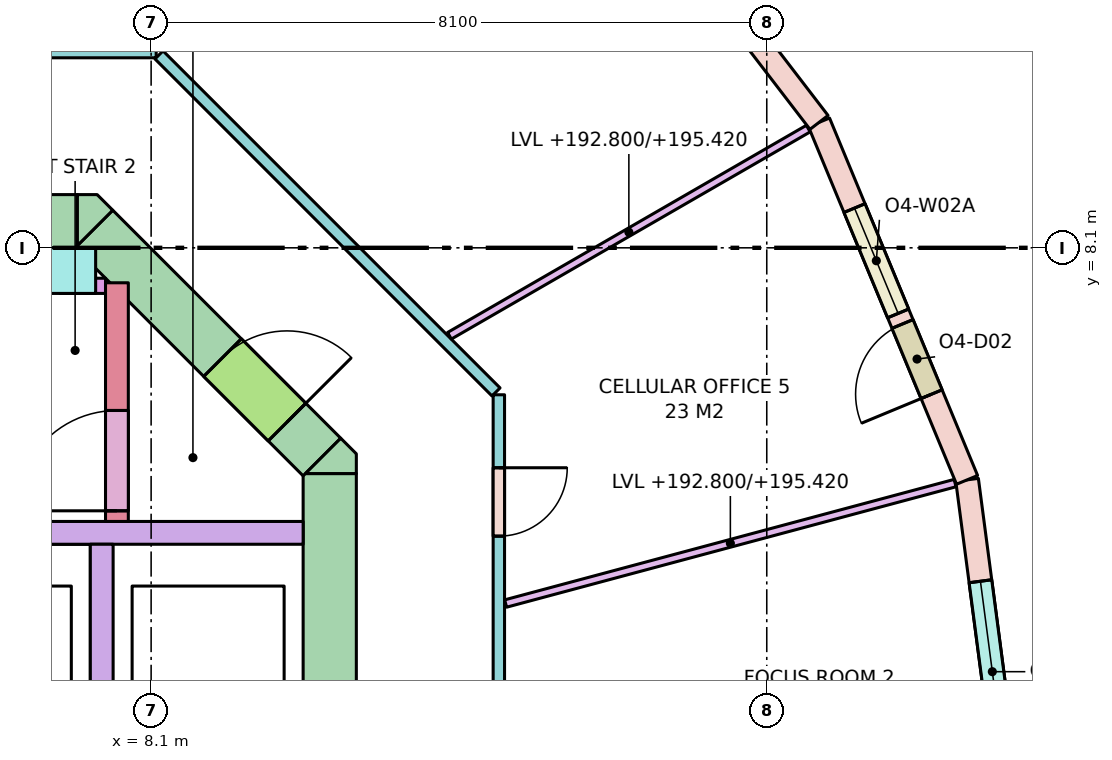
"""IFC4 building model, lengths in metres.
Left out: names, types, materials, properties, quantities, classifications, styles, units other than length and angle.
Written with IfcOpenShell. Run it as: python <this file> out.ifc"""

import sys

from ifc_helpers import new_model, si_unit, direction, frame, frame_2d, origin, place, context, subcontext, project, spatial, polyline, rectangle, outline, extrude, element, fill, save


model = new_model("IFC4")
c1 = context("Model", 3, precision=1e-05, world=origin(), true_north=direction((0.0, 1.0)))
c2 = subcontext(c1, "Body", "Model", "MODEL_VIEW")
j1 = project(units=[si_unit("LENGTHUNIT", "METRE"), si_unit("PLANEANGLEUNIT", "RADIAN")], contexts=[c1])
p1 = place(None, origin())
s1 = spatial("IfcSite", under=j1, at=p1, CompositionType="ELEMENT")
p2 = place(p1, origin())
s2 = spatial("IfcBuilding", under=s1, at=p2, CompositionType="ELEMENT")
p3 = place(p2, frame((0.0, 0.0, 192.8)))
s3 = spatial("IfcBuildingStorey", under=s2, at=p3, CompositionType="ELEMENT", Elevation=192.8)
p4 = place(p3, frame((-7.13, 8.45, -0.28), z_axis=(0.0, 0.0, 1.0), x_axis=(1.0, 0.0, 0.0)))
e1 = element("IfcWall", 1, at=p4, inside=s3, PredefinedType="SHEAR", context=c2, shape_type="SweptSolid", body=[
    extrude(rectangle(XDim=14.26, YDim=0.7, at=frame_2d((7.13, 0.0))), origin(), (0.0, 0.0, 1.0), 3.7),
])
p5 = place(p4, frame((5.48, 0.0, 0.28)))
e2 = element("IfcOpeningElement", 2, at=p5, cuts=e1, PredefinedType="OPENING", context=c2, shape_type="SweptSolid", body=[
    extrude(rectangle(XDim=0.7, YDim=2.1, at=frame_2d((0.35, 1.05))), frame((0.0, 0.36, 0.0), z_axis=(0.0, -1.0, 0.0), x_axis=(1.0, 0.0, 0.0)), (0.0, 0.0, 1.0), 0.72),
])
p6 = place(p4, frame((7.155, 0.0, 0.28)))
e3 = element("IfcOpeningElement", 3, at=p6, cuts=e1, PredefinedType="OPENING", context=c2, shape_type="SweptSolid", body=[
    extrude(rectangle(XDim=0.9, YDim=2.1, at=frame_2d((0.45, 1.05))), frame((0.0, 0.36, 0.0), z_axis=(0.0, -1.0, 0.0), x_axis=(1.0, 0.0, 0.0)), (0.0, 0.0, 1.0), 0.72),
])
p7 = place(p3, frame((10.45, -5.13, -0.28), z_axis=(0.0, 0.0, 1.0), x_axis=(0.0, 1.0, 0.0)))
e4 = element("IfcWall", 4, at=p7, inside=s3, PredefinedType="SHEAR", context=c2, shape_type="SweptSolid", body=[
    extrude(rectangle(XDim=10.26, YDim=0.7, at=frame_2d((5.13, 0.0))), origin(), (0.0, 0.0, 1.0), 3.7),
])
p8 = place(p7, frame((4.13, 0.0, 0.28)))
e5 = element("IfcOpeningElement", 5, at=p8, cuts=e4, PredefinedType="OPENING", context=c2, shape_type="SweptSolid", body=[
    extrude(rectangle(XDim=2.0, YDim=2.1, at=frame_2d((1.0, 1.05))), frame((0.0, 0.36, 0.0), z_axis=(0.0, -1.0, 0.0), x_axis=(1.0, 0.0, 0.0)), (0.0, 0.0, 1.0), 0.72),
])
p9 = place(p3, frame((7.347, 8.347, -0.28), z_axis=(0.0, 0.0, 1.0), x_axis=(0.707106781187, -0.707106781187, 0.0)))
e6 = element("IfcWall", 6, at=p9, inside=s3, PredefinedType="SHEAR", context=c2, shape_type="SweptSolid", body=[
    extrude(rectangle(XDim=4.243, YDim=0.7, at=frame_2d((2.121, 0.0))), origin(), (0.0, 0.0, 1.0), 3.7),
])
p10 = place(p9, frame((2.393, 0.0, 0.28)))
e7 = element("IfcOpeningElement", 7, at=p10, cuts=e6, PredefinedType="OPENING", context=c2, shape_type="SweptSolid", body=[
    extrude(rectangle(XDim=1.2, YDim=2.1, at=frame_2d((0.6, 1.05))), frame((0.0, 0.36, 0.0), z_axis=(0.0, -1.0, 0.0), x_axis=(1.0, 0.0, 0.0)), (0.0, 0.0, 1.0), 0.72),
])
p11 = place(p3, frame((0.0, 0.0, -0.28)))
e8 = element("IfcWall", 8, at=p11, inside=s3, PredefinedType="SHEAR", context=c2, shape_type="SweptSolid", body=[
    extrude(outline(polyline([(10.8, 5.39), (10.8, 5.13), (10.8, 5.13), (10.13, 5.13), (10.595, 5.595), (10.595, 5.595), (10.595, 5.595), (10.8, 5.39)])), origin(), (0.0, 0.0, 1.0), 3.7),
])
p12 = place(p3, frame((0.0, 0.0, -0.28)))
e9 = element("IfcWall", 9, at=p12, inside=s3, PredefinedType="SHEAR", context=c2, shape_type="SweptSolid", body=[
    extrude(outline(polyline([(7.39, 8.8), (7.595, 8.595), (7.595, 8.595), (7.595, 8.595), (7.13, 8.13), (7.13, 8.8), (7.13, 8.8), (7.39, 8.8)])), origin(), (0.0, 0.0, 1.0), 3.7),
])
p13 = place(p3, frame((2.0, 4.35, 0.0), z_axis=(0.0, 0.0, 1.0), x_axis=(1.0, 0.0, 0.0)))
e10 = element("IfcWall", 10, at=p13, inside=s3, PredefinedType="SOLIDWALL", context=c2, shape_type="SweptSolid", body=[
    extrude(rectangle(XDim=8.1, YDim=0.3, at=frame_2d((4.05, 0.0))), origin(), (0.0, 0.0, 1.0), 3.42),
])
p14 = place(p3, frame((7.45, 1.8, 0.0), z_axis=(0.0, 0.0, 1.0), x_axis=(0.0, 1.0, 0.0)))
e11 = element("IfcWall", 11, at=p14, inside=s3, PredefinedType="SOLIDWALL", context=c2, shape_type="SweptSolid", body=[
    extrude(rectangle(XDim=2.4, YDim=0.3, at=frame_2d((1.2, 0.0))), origin(), (0.0, 0.0, 1.0), 3.42),
])
p15 = place(p3, frame((7.65, 4.5, 0.0), z_axis=(0.0, 0.0, 1.0), x_axis=(0.0, 1.0, 0.0)))
e12 = element("IfcWall", 12, at=p15, inside=s3, PredefinedType="SHEAR", context=c2, shape_type="SweptSolid", body=[
    extrude(rectangle(XDim=3.14, YDim=0.3, at=frame_2d((1.57, 0.0))), origin(), (0.0, 0.0, 1.0), 3.42),
])
p16 = place(p15, frame((0.14, 0.0, 0.0)))
e13 = element("IfcOpeningElement", 13, at=p16, cuts=e12, PredefinedType="OPENING", context=c2, shape_type="SweptSolid", body=[
    extrude(rectangle(XDim=1.32, YDim=2.1, at=frame_2d((0.66, 1.05))), frame((0.0, 0.16, 0.0), z_axis=(0.0, -1.0, 0.0), x_axis=(1.0, 0.0, 0.0)), (0.0, 0.0, 1.0), 0.32),
])
p17 = place(p3, frame((2.0, 7.8, 0.0), z_axis=(0.0, 0.0, 1.0), x_axis=(1.0, 0.0, 0.0)))
e14 = element("IfcWall", 14, at=p17, inside=s3, PredefinedType="SHEAR", context=c2, shape_type="SweptSolid", body=[
    extrude(rectangle(XDim=5.37, YDim=0.6, at=frame_2d((2.685, 0.0))), origin(), (0.0, 0.0, 1.0), 3.42),
])
p18 = place(p3, frame((6.9, 7.6, 0.0), z_axis=(0.0, 0.0, 1.0), x_axis=(1.0, 0.0, 0.0)))
e15 = element("IfcWall", 15, at=p18, inside=s3, PredefinedType="SHEAR", context=c2, shape_type="SweptSolid", body=[
    extrude(rectangle(XDim=0.6, YDim=0.2, at=frame_2d((0.3, 0.0))), origin(), (0.0, 0.0, 1.0), 3.42),
])
p19 = place(p3, frame((19.5, 0.0, 0.0), z_axis=(0.0, 0.0, 1.0), x_axis=(-0.130495451964, 0.99144890792, 0.0)))
e16 = element("IfcWall", 16, at=p19, inside=s3, PredefinedType="STANDARD", context=c2, shape_type="SweptSolid", body=[
    extrude(rectangle(XDim=5.091, YDim=0.3, at=frame_2d((2.545, 0.0))), origin(), (0.0, 0.0, 1.0), 3.42),
])
p20 = place(p19, frame((1.345, 0.0, 0.8)))
e17 = element("IfcOpeningElement", 17, at=p20, cuts=e16, PredefinedType="OPENING", context=c2, shape_type="SweptSolid", body=[
    extrude(rectangle(XDim=2.4, YDim=2.4, at=frame_2d((1.2, 1.2))), frame((0.0, 0.16, 0.0), z_axis=(0.0, -1.0, 0.0), x_axis=(1.0, 0.0, 0.0)), (0.0, 0.0, 1.0), 0.32),
])
p21 = place(p3, frame((18.836, 5.047, 0.0), z_axis=(0.0, 0.0, 1.0), x_axis=(-0.382724538613, 0.923862504675, 0.0)))
e18 = element("IfcWall", 18, at=p21, inside=s3, PredefinedType="STANDARD", context=c2, shape_type="SweptSolid", body=[
    extrude(rectangle(XDim=5.091, YDim=0.3, at=frame_2d((2.545, 0.0))), origin(), (0.0, 0.0, 1.0), 3.42),
])
p22 = place(p21, frame((1.22, 0.0, 0.0)))
e19 = element("IfcOpeningElement", 19, at=p22, cuts=e18, PredefinedType="OPENING", context=c2, shape_type="SweptSolid", body=[
    extrude(rectangle(XDim=1.0, YDim=2.4, at=frame_2d((0.5, 1.2))), frame((0.0, 0.16, 0.0), z_axis=(0.0, -1.0, 0.0), x_axis=(1.0, 0.0, 0.0)), (0.0, 0.0, 1.0), 0.32),
])
p23 = place(p21, frame((2.37, 0.0, 0.8)))
e20 = element("IfcOpeningElement", 20, at=p23, cuts=e18, PredefinedType="OPENING", context=c2, shape_type="SweptSolid", body=[
    extrude(rectangle(XDim=1.5, YDim=2.4, at=frame_2d((0.75, 1.2))), frame((0.0, 0.16, 0.0), z_axis=(0.0, -1.0, 0.0), x_axis=(1.0, 0.0, 0.0)), (0.0, 0.0, 1.0), 0.32),
])
p24 = place(p3, frame((16.887, 9.75, 0.0), z_axis=(0.0, 0.0, 1.0), x_axis=(-0.608757714995, 0.79335619014, 0.0)))
e21 = element("IfcWall", 21, at=p24, inside=s3, PredefinedType="STANDARD", context=c2, shape_type="SweptSolid", body=[
    extrude(rectangle(XDim=5.091, YDim=0.3, at=frame_2d((2.545, 0.0))), origin(), (0.0, 0.0, 1.0), 3.42),
])
p25 = place(p24, frame((1.345, 0.0, 0.8)))
e22 = element("IfcOpeningElement", 22, at=p25, cuts=e21, PredefinedType="OPENING", context=c2, shape_type="SweptSolid", body=[
    extrude(rectangle(XDim=2.4, YDim=2.4, at=frame_2d((1.2, 1.2))), frame((0.0, 0.16, 0.0), z_axis=(0.0, -1.0, 0.0), x_axis=(1.0, 0.0, 0.0)), (0.0, 0.0, 1.0), 0.32),
])
p26 = place(p3, frame((-8.167, 10.675, 0.0), z_axis=(0.0, 0.0, 1.0), x_axis=(1.0, 0.0, 0.0)))
e23 = element("IfcWall", 23, at=p26, inside=s3, PredefinedType="PARTITIONING", context=c2, shape_type="SweptSolid", body=[
    extrude(rectangle(XDim=16.333, YDim=0.15, at=frame_2d((8.167, 0.0))), origin(), (0.0, 0.0, 1.0), 2.62),
])
p27 = place(p26, frame((8.24, 0.0, 0.0)))
e24 = element("IfcOpeningElement", 24, at=p27, cuts=e23, PredefinedType="OPENING", context=c2, shape_type="SweptSolid", body=[
    extrude(rectangle(XDim=1.8, YDim=2.1, at=frame_2d((0.9, 1.05))), frame((0.0, 0.085, 0.0), z_axis=(0.0, -1.0, 0.0), x_axis=(1.0, 0.0, 0.0)), (0.0, 0.0, 1.0), 0.17),
])
p28 = place(p3, frame((8.204, 10.638, 0.0), z_axis=(0.0, 0.0, 1.0), x_axis=(0.707106781187, -0.707106781187, 0.0)))
e25 = element("IfcWall", 25, at=p28, inside=s3, PredefinedType="PARTITIONING", context=c2, shape_type="SweptSolid", body=[
    extrude(rectangle(XDim=6.271, YDim=0.15, at=frame_2d((3.135, 0.0))), origin(), (0.0, 0.0, 1.0), 2.62),
])
p29 = place(p3, frame((12.675, 6.167, 0.0), z_axis=(0.0, 0.0, 1.0), x_axis=(0.0, -1.0, 0.0)))
e26 = element("IfcWall", 26, at=p29, inside=s3, PredefinedType="PARTITIONING", context=c2, shape_type="SweptSolid", body=[
    extrude(rectangle(XDim=9.563, YDim=0.15, at=frame_2d((4.781, 0.0))), origin(), (0.0, 0.0, 1.0), 2.62),
])
p30 = place(p29, frame((6.94, 0.0, 0.0)))
e27 = element("IfcOpeningElement", 27, at=p30, cuts=e26, PredefinedType="OPENING", context=c2, shape_type="SweptSolid", body=[
    extrude(rectangle(XDim=1.8, YDim=2.1, at=frame_2d((0.9, 1.05))), frame((0.0, 0.085, 0.0), z_axis=(0.0, -1.0, 0.0), x_axis=(1.0, 0.0, 0.0)), (0.0, 0.0, 1.0), 0.17),
])
p31 = place(p29, frame((4.018, 0.0, 0.0)))
e28 = element("IfcOpeningElement", 28, at=p31, cuts=e26, PredefinedType="OPENING", context=c2, shape_type="SweptSolid", body=[
    extrude(rectangle(XDim=0.9, YDim=2.1, at=frame_2d((0.45, 1.05))), frame((0.0, 0.085, 0.0), z_axis=(0.0, -1.0, 0.0), x_axis=(1.0, 0.0, 0.0)), (0.0, 0.0, 1.0), 0.17),
])
p32 = place(p29, frame((0.96, 0.0, 0.0)))
e29 = element("IfcOpeningElement", 29, at=p32, cuts=e26, PredefinedType="OPENING", context=c2, shape_type="SweptSolid", body=[
    extrude(rectangle(XDim=0.9, YDim=2.1, at=frame_2d((0.45, 1.05))), frame((0.0, 0.085, 0.0), z_axis=(0.0, -1.0, 0.0), x_axis=(1.0, 0.0, 0.0)), (0.0, 0.0, 1.0), 0.17),
])
p33 = place(p3, frame((12.764, 3.42, 0.0), z_axis=(0.0, 0.0, 1.0), x_axis=(0.965925800266, 0.258819142221, 0.0)))
e30 = element("IfcWall", 30, at=p33, inside=s3, PredefinedType="PARTITIONING", context=c2, shape_type="SweptSolid", body=[
    extrude(rectangle(XDim=6.122, YDim=0.1, at=frame_2d((3.061, 0.0))), origin(), (0.0, 0.0, 1.0), 2.62),
])
p34 = place(p3, frame((12.025, 6.943, 0.0), z_axis=(0.0, 0.0, 1.0), x_axis=(0.866029712004, 0.499992537871, 0.0)))
e31 = element("IfcWall", 31, at=p34, inside=s3, PredefinedType="PARTITIONING", context=c2, shape_type="SweptSolid", body=[
    extrude(rectangle(XDim=5.451, YDim=0.1, at=frame_2d((2.726, 0.0))), origin(), (0.0, 0.0, 1.0), 2.62),
])
p35 = place(p20, origin())
e32 = element("IfcWindow", 32, at=p35, inside=s3, PartitioningType="SINGLE_PANEL", PredefinedType="WINDOW", context=c2, shape_type="SweptSolid", body=[
    extrude(rectangle(XDim=2.4, YDim=2.4, at=frame_2d((1.2, 1.2))), frame((0.0, 0.03, 0.0), z_axis=(0.0, -1.0, 0.0), x_axis=(1.0, 0.0, 0.0)), (0.0, 0.0, 1.0), 0.06),
])
fill(e17, e32)
p36 = place(p22, origin())
e33 = element("IfcDoor", 33, at=p36, inside=s3, OperationType="SINGLE_SWING_LEFT", PredefinedType="DOOR", context=c2, shape_type="SweptSolid", body=[
    extrude(rectangle(XDim=1.0, YDim=2.4, at=frame_2d((0.5, 1.2))), frame((0.0, 0.025, 0.0), z_axis=(0.0, -1.0, 0.0), x_axis=(1.0, 0.0, 0.0)), (0.0, 0.0, 1.0), 0.05),
])
fill(e19, e33)
p37 = place(p23, origin())
e34 = element("IfcWindow", 34, at=p37, inside=s3, PartitioningType="SINGLE_PANEL", PredefinedType="WINDOW", context=c2, shape_type="SweptSolid", body=[
    extrude(rectangle(XDim=1.5, YDim=2.4, at=frame_2d((0.75, 1.2))), frame((0.0, 0.03, 0.0), z_axis=(0.0, -1.0, 0.0), x_axis=(1.0, 0.0, 0.0)), (0.0, 0.0, 1.0), 0.06),
])
fill(e20, e34)
p38 = place(p16, origin())
e35 = element("IfcDoor", 35, at=p38, inside=s3, OperationType="DOUBLE_DOOR_SINGLE_SWING", PredefinedType="DOOR", context=c2, shape_type="SweptSolid", body=[
    extrude(rectangle(XDim=1.32, YDim=2.1, at=frame_2d((0.66, 1.05))), frame((0.0, 0.025, 0.0), z_axis=(0.0, -1.0, 0.0), x_axis=(1.0, 0.0, 0.0)), (0.0, 0.0, 1.0), 0.05),
])
fill(e13, e35)
p39 = place(p10, origin())
e36 = element("IfcDoor", 36, at=p39, inside=s3, OperationType="SINGLE_SWING_RIGHT", PredefinedType="DOOR", context=c2, shape_type="SweptSolid", body=[
    extrude(rectangle(XDim=1.2, YDim=2.1, at=frame_2d((0.6, 1.05))), frame((0.0, 0.025, 0.0), z_axis=(0.0, -1.0, 0.0), x_axis=(1.0, 0.0, 0.0)), (0.0, 0.0, 1.0), 0.05),
])
fill(e7, e36)
p40 = place(p32, origin())
e37 = element("IfcDoor", 37, at=p40, inside=s3, OperationType="SINGLE_SWING_LEFT", PredefinedType="DOOR", context=c2, shape_type="SweptSolid", body=[
    extrude(rectangle(XDim=0.9, YDim=2.1, at=frame_2d((0.45, 1.05))), frame((0.0, 0.025, 0.0), z_axis=(0.0, -1.0, 0.0), x_axis=(1.0, 0.0, 0.0)), (0.0, 0.0, 1.0), 0.05),
])
fill(e29, e37)
save(model, sys.argv[1])
